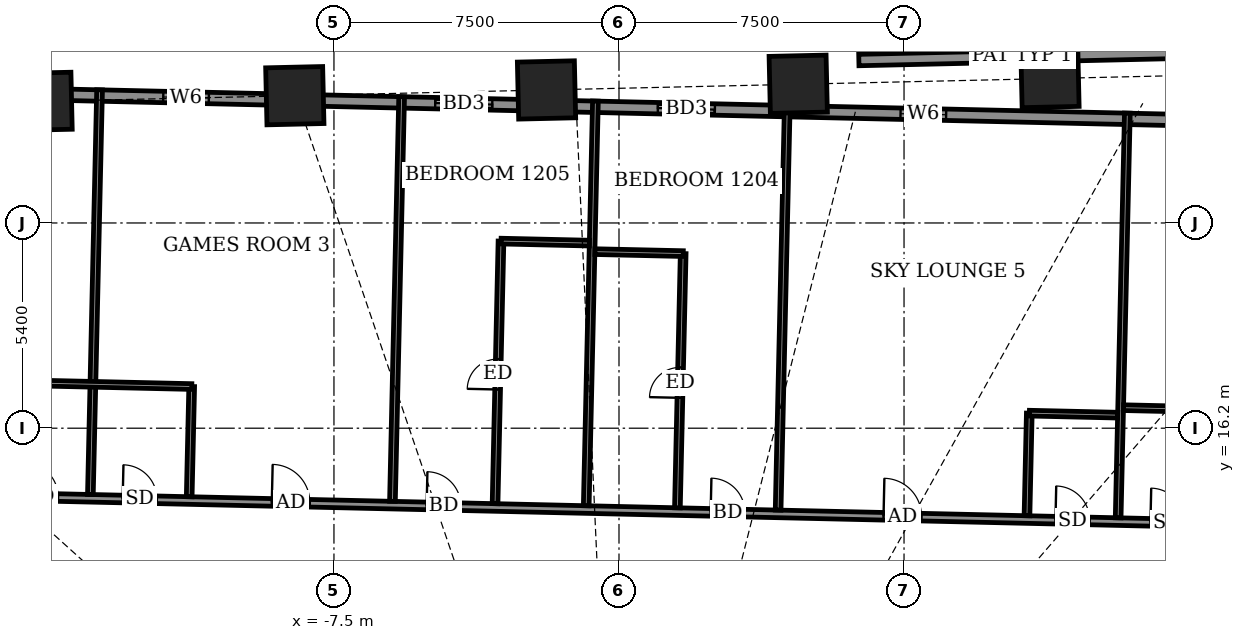
"""IFC4 building model, lengths in metres.
Left out: names, types, materials, properties, quantities, classifications, styles, units other than length and angle.
Written with IfcOpenShell. Run it as: python <this file> out.ifc"""

import sys

from ifc_helpers import new_model, si_unit, direction, frame, frame_2d, origin, origin_2d, place, context, subcontext, project, spatial, rectangle, extrude, element, fill, save


model = new_model("IFC4")
c1 = context("Model", 3, precision=1e-05, world=origin(), true_north=direction((0.0, 1.0)))
c2 = subcontext(c1, "Body", "Model", "MODEL_VIEW")
j1 = project(units=[si_unit("LENGTHUNIT", "METRE"), si_unit("PLANEANGLEUNIT", "RADIAN")], contexts=[c1])
p1 = place(None, origin())
s1 = spatial("IfcSite", under=j1, at=p1, CompositionType="ELEMENT")
p2 = place(p1, origin())
s2 = spatial("IfcBuilding", under=s1, at=p2, CompositionType="ELEMENT")
p3 = place(p2, frame((0.0, 0.0, 52.1)))
s3 = spatial("IfcBuildingStorey", under=s2, at=p3, CompositionType="ELEMENT", Elevation=52.1)
for number, where, z_axis, x_axis in (
    (1, (11.34, 25.4, -0.55), (0.0, 0.0, 1.0), (-1.0, -0.023, 0.0)),
    (2, (4.716, 25.25, -0.55), (0.0, 0.0, 1.0), (-1.0, -0.023, 0.0)),
    (3, (-1.907, 25.1, -0.55), (0.0, 0.0, 1.0), (-1.0, -0.023, 0.0)),
    (4, (-8.53, 24.949, -0.55), (0.0, 0.0, 1.0), (-1.0, -0.023, 0.0)),
    (5, (-15.154, 24.799, -0.55), (0.0, 0.0, 1.0), (-1.0, -0.023, 0.0)),
):
    element("IfcColumn", number, at=place(p3, frame(where, z_axis=z_axis, x_axis=x_axis)), inside=s3, PredefinedType="COLUMN", context=c2, shape_type="SweptSolid", body=[
        extrude(rectangle(XDim=1.5, YDim=1.5, at=origin_2d()), origin(), (0.0, 0.0, 1.0), 4.6),
    ])
p4 = place(p3, frame((27.407, 24.021, 0.0), z_axis=(0.0, 0.0, 1.0), x_axis=(-0.999742614779, 0.02268709312, 0.0)))
e6 = element("IfcWall", 6, at=p4, inside=s3, PredefinedType="SOLIDWALL", context=c2, shape_type="SweptSolid", body=[
    extrude(rectangle(XDim=49.943, YDim=0.3, at=frame_2d((24.971, 0.0))), origin(), (0.0, 0.0, 1.0), 2.25),
])
p5 = place(p4, frame((0.506, 0.0, 0.0)))
e7 = element("IfcOpeningElement", 7, at=p5, cuts=e6, PredefinedType="OPENING", context=c2, shape_type="SweptSolid", body=[
    extrude(rectangle(XDim=1.5, YDim=2.0, at=frame_2d((0.75, 1.0))), frame((0.0, 0.16, 0.0), z_axis=(0.0, -1.0, 0.0), x_axis=(1.0, 0.0, 0.0)), (0.0, 0.0, 1.0), 0.32),
])
p6 = place(p4, frame((11.448, 0.0, 0.5)))
e8 = element("IfcOpeningElement", 8, at=p6, cuts=e6, PredefinedType="OPENING", context=c2, shape_type="SweptSolid", body=[
    extrude(rectangle(XDim=1.2, YDim=1.1, at=frame_2d((0.6, 0.55))), frame((0.0, 0.16, 0.0), z_axis=(0.0, -1.0, 0.0), x_axis=(1.0, 0.0, 0.0)), (0.0, 0.0, 1.0), 0.32),
])
p7 = place(p4, frame((18.804, 0.0, 0.5)))
e9 = element("IfcOpeningElement", 9, at=p7, cuts=e6, PredefinedType="OPENING", context=c2, shape_type="SweptSolid", body=[
    extrude(rectangle(XDim=1.2, YDim=1.1, at=frame_2d((0.6, 0.55))), frame((0.0, 0.16, 0.0), z_axis=(0.0, -1.0, 0.0), x_axis=(1.0, 0.0, 0.0)), (0.0, 0.0, 1.0), 0.32),
])
p8 = place(p4, frame((24.891, 0.0, 0.0)))
e10 = element("IfcOpeningElement", 10, at=p8, cuts=e6, PredefinedType="OPENING", context=c2, shape_type="SweptSolid", body=[
    extrude(rectangle(XDim=1.5, YDim=2.0, at=frame_2d((0.75, 1.0))), frame((0.0, 0.16, 0.0), z_axis=(0.0, -1.0, 0.0), x_axis=(1.0, 0.0, 0.0)), (0.0, 0.0, 1.0), 0.32),
])
p9 = place(p4, frame((30.75, 0.0, 0.0)))
e11 = element("IfcOpeningElement", 11, at=p9, cuts=e6, PredefinedType="OPENING", context=c2, shape_type="SweptSolid", body=[
    extrude(rectangle(XDim=1.5, YDim=2.0, at=frame_2d((0.75, 1.0))), frame((0.0, 0.16, 0.0), z_axis=(0.0, -1.0, 0.0), x_axis=(1.0, 0.0, 0.0)), (0.0, 0.0, 1.0), 0.32),
])
p10 = place(p4, frame((38.209, 0.0, 0.5)))
e12 = element("IfcOpeningElement", 12, at=p10, cuts=e6, PredefinedType="OPENING", context=c2, shape_type="SweptSolid", body=[
    extrude(rectangle(XDim=1.2, YDim=1.1, at=frame_2d((0.6, 0.55))), frame((0.0, 0.16, 0.0), z_axis=(0.0, -1.0, 0.0), x_axis=(1.0, 0.0, 0.0)), (0.0, 0.0, 1.0), 0.32),
])
p11 = place(p4, frame((45.277, 0.0, 0.5)))
e13 = element("IfcOpeningElement", 13, at=p11, cuts=e6, PredefinedType="OPENING", context=c2, shape_type="SweptSolid", body=[
    extrude(rectangle(XDim=1.2, YDim=1.1, at=frame_2d((0.6, 0.55))), frame((0.0, 0.16, 0.0), z_axis=(0.0, -1.0, 0.0), x_axis=(1.0, 0.0, 0.0)), (0.0, 0.0, 1.0), 0.32),
])
p12 = place(p3, frame((6.311, 25.887, 0.0), z_axis=(0.0, 0.0, 1.0), x_axis=(0.999744761435, 0.022592299185, 0.0)))
e14 = element("IfcWall", 14, at=p12, inside=s3, PredefinedType="PARAPET", context=c2, shape_type="SweptSolid", body=[
    extrude(rectangle(XDim=8.591, YDim=0.3, at=frame_2d((4.295, 0.0))), origin(), (0.0, 0.0, 1.0), 0.9),
])
p13 = place(p3, frame((-26.206, 14.635, 0.0), z_axis=(0.0, 0.0, 1.0), x_axis=(0.999742550532, -0.022689924097, 0.0)))
e15 = element("IfcWall", 15, at=p13, inside=s3, PredefinedType="PARTITIONING", context=c2, shape_type="SweptSolid", body=[
    extrude(rectangle(XDim=53.025, YDim=0.2, at=frame_2d((26.512, 0.0))), origin(), (0.0, 0.0, 1.0), 2.1),
])
p14 = place(p13, frame((51.824, 0.0, 0.0)))
e16 = element("IfcOpeningElement", 16, at=p14, cuts=e15, PredefinedType="OPENING", context=c2, shape_type="SweptSolid", body=[
    extrude(rectangle(XDim=1.0, YDim=2.1, at=frame_2d((0.5, 1.05))), frame((0.0, 0.11, 0.0), z_axis=(0.0, -1.0, 0.0), x_axis=(1.0, 0.0, 0.0)), (0.0, 0.0, 1.0), 0.22),
])
p15 = place(p13, frame((48.1, 0.0, 0.0)))
e17 = element("IfcOpeningElement", 17, at=p15, cuts=e15, PredefinedType="OPENING", context=c2, shape_type="SweptSolid", body=[
    extrude(rectangle(XDim=0.9, YDim=2.1, at=frame_2d((0.45, 1.05))), frame((0.0, 0.11, 0.0), z_axis=(0.0, -1.0, 0.0), x_axis=(1.0, 0.0, 0.0)), (0.0, 0.0, 1.0), 0.22),
])
p16 = place(p13, frame((44.1, 0.0, 0.0)))
e18 = element("IfcOpeningElement", 18, at=p16, cuts=e15, PredefinedType="OPENING", context=c2, shape_type="SweptSolid", body=[
    extrude(rectangle(XDim=1.0, YDim=2.1, at=frame_2d((0.5, 1.05))), frame((0.0, 0.11, 0.0), z_axis=(0.0, -1.0, 0.0), x_axis=(1.0, 0.0, 0.0)), (0.0, 0.0, 1.0), 0.22),
])
p17 = place(p13, frame((40.2, 0.0, 0.0)))
e19 = element("IfcOpeningElement", 19, at=p17, cuts=e15, PredefinedType="OPENING", context=c2, shape_type="SweptSolid", body=[
    extrude(rectangle(XDim=0.9, YDim=2.1, at=frame_2d((0.45, 1.05))), frame((0.0, 0.11, 0.0), z_axis=(0.0, -1.0, 0.0), x_axis=(1.0, 0.0, 0.0)), (0.0, 0.0, 1.0), 0.22),
])
p18 = place(p13, frame((33.175, 0.0, 0.0)))
e20 = element("IfcOpeningElement", 20, at=p18, cuts=e15, PredefinedType="OPENING", context=c2, shape_type="SweptSolid", body=[
    extrude(rectangle(XDim=1.0, YDim=2.1, at=frame_2d((0.5, 1.05))), frame((0.0, 0.11, 0.0), z_axis=(0.0, -1.0, 0.0), x_axis=(1.0, 0.0, 0.0)), (0.0, 0.0, 1.0), 0.22),
])
p19 = place(p13, frame((37.7, 0.0, 0.0)))
e21 = element("IfcOpeningElement", 21, at=p19, cuts=e15, PredefinedType="OPENING", context=c2, shape_type="SweptSolid", body=[
    extrude(rectangle(XDim=0.9, YDim=2.1, at=frame_2d((0.45, 1.05))), frame((0.0, 0.11, 0.0), z_axis=(0.0, -1.0, 0.0), x_axis=(1.0, 0.0, 0.0)), (0.0, 0.0, 1.0), 0.22),
])
p20 = place(p13, frame((28.625, 0.0, 0.0)))
e22 = element("IfcOpeningElement", 22, at=p20, cuts=e15, PredefinedType="OPENING", context=c2, shape_type="SweptSolid", body=[
    extrude(rectangle(XDim=0.9, YDim=2.1, at=frame_2d((0.45, 1.05))), frame((0.0, 0.11, 0.0), z_axis=(0.0, -1.0, 0.0), x_axis=(1.0, 0.0, 0.0)), (0.0, 0.0, 1.0), 0.22),
])
p21 = place(p13, frame((21.15, 0.0, 0.0)))
e23 = element("IfcOpeningElement", 23, at=p21, cuts=e15, PredefinedType="OPENING", context=c2, shape_type="SweptSolid", body=[
    extrude(rectangle(XDim=0.9, YDim=2.1, at=frame_2d((0.45, 1.05))), frame((0.0, 0.11, 0.0), z_axis=(0.0, -1.0, 0.0), x_axis=(1.0, 0.0, 0.0)), (0.0, 0.0, 1.0), 0.22),
])
p22 = place(p13, frame((17.075, 0.0, 0.0)))
e24 = element("IfcOpeningElement", 24, at=p22, cuts=e15, PredefinedType="OPENING", context=c2, shape_type="SweptSolid", body=[
    extrude(rectangle(XDim=1.0, YDim=2.1, at=frame_2d((0.5, 1.05))), frame((0.0, 0.11, 0.0), z_axis=(0.0, -1.0, 0.0), x_axis=(1.0, 0.0, 0.0)), (0.0, 0.0, 1.0), 0.22),
])
p23 = place(p13, frame((13.15, 0.0, 0.0)))
e25 = element("IfcOpeningElement", 25, at=p23, cuts=e15, PredefinedType="OPENING", context=c2, shape_type="SweptSolid", body=[
    extrude(rectangle(XDim=0.9, YDim=2.1, at=frame_2d((0.45, 1.05))), frame((0.0, 0.11, 0.0), z_axis=(0.0, -1.0, 0.0), x_axis=(1.0, 0.0, 0.0)), (0.0, 0.0, 1.0), 0.22),
])
p24 = place(p13, frame((3.65, 0.0, 0.0)))
e26 = element("IfcOpeningElement", 26, at=p24, cuts=e15, PredefinedType="OPENING", context=c2, shape_type="SweptSolid", body=[
    extrude(rectangle(XDim=1.0, YDim=2.1, at=frame_2d((0.5, 1.05))), frame((0.0, 0.11, 0.0), z_axis=(0.0, -1.0, 0.0), x_axis=(1.0, 0.0, 0.0)), (0.0, 0.0, 1.0), 0.22),
])
p25 = place(p13, frame((10.55, 0.0, 0.0)))
e27 = element("IfcOpeningElement", 27, at=p25, cuts=e15, PredefinedType="OPENING", context=c2, shape_type="SweptSolid", body=[
    extrude(rectangle(XDim=0.9, YDim=2.1, at=frame_2d((0.45, 1.05))), frame((0.0, 0.11, 0.0), z_axis=(0.0, -1.0, 0.0), x_axis=(1.0, 0.0, 0.0)), (0.0, 0.0, 1.0), 0.22),
])
p26 = place(p3, frame((-13.909, 14.456, 0.0), z_axis=(0.0, 0.0, 1.0), x_axis=(0.022718280885, 0.999741906551, 0.0)))
e28 = element("IfcWall", 28, at=p26, inside=s3, PredefinedType="PARTITIONING", context=c2, shape_type="SweptSolid", body=[
    extrude(rectangle(XDim=10.65, YDim=0.15, at=frame_2d((5.325, 0.0))), origin(), (0.0, 0.0, 1.0), 2.35),
])
p27 = place(p3, frame((-11.309, 14.397, 0.0), z_axis=(0.0, 0.0, 1.0), x_axis=(0.022817032779, 0.999739657619, 0.0)))
e29 = element("IfcWall", 29, at=p27, inside=s3, PredefinedType="PARTITIONING", context=c2, shape_type="SweptSolid", body=[
    extrude(rectangle(XDim=2.9, YDim=0.15, at=frame_2d((1.45, 0.0))), origin(), (0.0, 0.0, 1.0), 4.05),
])
p28 = place(p3, frame((-5.961, 14.276, 0.0), z_axis=(0.0, 0.0, 1.0), x_axis=(0.022717760224, 0.999741918382, 0.0)))
e30 = element("IfcWall", 30, at=p28, inside=s3, PredefinedType="PARTITIONING", context=c2, shape_type="SweptSolid", body=[
    extrude(rectangle(XDim=10.65, YDim=0.15, at=frame_2d((5.325, 0.0))), origin(), (0.0, 0.0, 1.0), 2.35),
])
p29 = place(p3, frame((-3.261, 14.214, 0.0), z_axis=(0.0, 0.0, 1.0), x_axis=(0.022574548881, 0.9997451624, 0.0)))
e31 = element("IfcWall", 31, at=p29, inside=s3, PredefinedType="PARTITIONING", context=c2, shape_type="SweptSolid", body=[
    extrude(rectangle(XDim=6.911, YDim=0.15, at=frame_2d((3.455, 0.0))), origin(), (0.0, 0.0, 1.0), 4.05),
])
p30 = place(p29, frame((3.005, 0.0, 0.0)))
e32 = element("IfcOpeningElement", 32, at=p30, cuts=e31, PredefinedType="OPENING", context=c2, shape_type="SweptSolid", body=[
    extrude(rectangle(XDim=0.8, YDim=2.1, at=frame_2d((0.4, 1.05))), frame((0.0, 0.085, 0.0), z_axis=(0.0, -1.0, 0.0), x_axis=(1.0, 0.0, 0.0)), (0.0, 0.0, 1.0), 0.17),
])
p31 = place(p3, frame((-0.862, 14.16, 0.0), z_axis=(0.0, 0.0, 1.0), x_axis=(0.022718280885, 0.999741906551, 0.0)))
e33 = element("IfcWall", 33, at=p31, inside=s3, PredefinedType="PARTITIONING", context=c2, shape_type="SweptSolid", body=[
    extrude(rectangle(XDim=10.65, YDim=0.15, at=frame_2d((5.325, 0.0))), origin(), (0.0, 0.0, 1.0), 2.35),
])
p32 = place(p3, frame((1.537, 14.105, 0.0), z_axis=(0.0, 0.0, 1.0), x_axis=(0.022696538909, 0.999742400382, 0.0)))
e34 = element("IfcWall", 34, at=p32, inside=s3, PredefinedType="PARTITIONING", context=c2, shape_type="SweptSolid", body=[
    extrude(rectangle(XDim=6.691, YDim=0.15, at=frame_2d((3.345, 0.0))), origin(), (0.0, 0.0, 1.0), 4.05),
])
p33 = place(p32, frame((2.895, 0.0, 0.0)))
e35 = element("IfcOpeningElement", 35, at=p33, cuts=e34, PredefinedType="OPENING", context=c2, shape_type="SweptSolid", body=[
    extrude(rectangle(XDim=0.8, YDim=2.1, at=frame_2d((0.4, 1.05))), frame((0.0, 0.085, 0.0), z_axis=(0.0, -1.0, 0.0), x_axis=(1.0, 0.0, 0.0)), (0.0, 0.0, 1.0), 0.17),
])
p34 = place(p3, frame((4.187, 14.045, 0.0), z_axis=(0.0, 0.0, 1.0), x_axis=(0.02262403694, 0.999744043719, 0.0)))
e36 = element("IfcWall", 36, at=p34, inside=s3, PredefinedType="PARTITIONING", context=c2, shape_type="SweptSolid", body=[
    extrude(rectangle(XDim=10.651, YDim=0.15, at=frame_2d((5.325, 0.0))), origin(), (0.0, 0.0, 1.0), 2.65),
])
p35 = place(p3, frame((10.735, 13.897, 0.0), z_axis=(0.0, 0.0, 1.0), x_axis=(0.022518033722, 0.999746436932, 0.0)))
e37 = element("IfcWall", 37, at=p35, inside=s3, PredefinedType="PARTITIONING", context=c2, shape_type="SweptSolid", body=[
    extrude(rectangle(XDim=2.7, YDim=0.15, at=frame_2d((1.35, 0.0))), origin(), (0.0, 0.0, 1.0), 4.05),
])
p36 = place(p3, frame((13.134, 13.842, 0.0), z_axis=(0.0, 0.0, 1.0), x_axis=(0.022716198383, 0.999741953872, 0.0)))
e38 = element("IfcWall", 38, at=p36, inside=s3, PredefinedType="PARTITIONING", context=c2, shape_type="SweptSolid", body=[
    extrude(rectangle(XDim=10.651, YDim=0.15, at=frame_2d((5.325, 0.0))), origin(), (0.0, 0.0, 1.0), 2.25),
])
p37 = place(p3, frame((10.798, 16.596, 0.0), z_axis=(0.0, 0.0, 1.0), x_axis=(0.999740478815, -0.022781023197, 0.0)))
e39 = element("IfcWall", 39, at=p37, inside=s3, PredefinedType="PARTITIONING", context=c2, shape_type="SweptSolid", body=[
    extrude(rectangle(XDim=2.325, YDim=0.15, at=frame_2d((1.163, 0.0))), origin(), (0.0, 0.0, 1.0), 4.05),
])
p38 = place(p3, frame((-16.44, 17.414, 0.0), z_axis=(0.0, 0.0, 1.0), x_axis=(0.999741811307, -0.022722471786, 0.0)))
e40 = element("IfcWall", 40, at=p38, inside=s3, PredefinedType="PARTITIONING", context=c2, shape_type="SweptSolid", body=[
    extrude(rectangle(XDim=5.2, YDim=0.15, at=frame_2d((2.6, 0.0))), origin(), (0.0, 0.0, 1.0), 4.05),
])
p39 = place(p3, frame((13.277, 16.74, 0.0), z_axis=(0.0, 0.0, 1.0), x_axis=(0.999746307581, -0.022523775833, 0.0)))
e41 = element("IfcWall", 41, at=p39, inside=s3, PredefinedType="PARTITIONING", context=c2, shape_type="SweptSolid", body=[
    extrude(rectangle(XDim=2.526, YDim=0.15, at=frame_2d((1.263, 0.0))), origin(), (0.0, 0.0, 1.0), 2.25),
])
p40 = place(p3, frame((-0.633, 20.846, 0.0), z_axis=(0.0, 0.0, 1.0), x_axis=(0.999749744571, -0.022370700241, 0.0)))
e42 = element("IfcWall", 42, at=p40, inside=s3, PredefinedType="PARTITIONING", context=c2, shape_type="SweptSolid", body=[
    extrude(rectangle(XDim=2.324, YDim=0.15, at=frame_2d((1.162, 0.0))), origin(), (0.0, 0.0, 1.0), 2.75),
])
p41 = place(p3, frame((-3.103, 21.123, 0.0), z_axis=(0.0, 0.0, 1.0), x_axis=(0.999740478815, -0.022781023197, 0.0)))
e43 = element("IfcWall", 43, at=p41, inside=s3, PredefinedType="PARTITIONING", context=c2, shape_type="SweptSolid", body=[
    extrude(rectangle(XDim=2.325, YDim=0.15, at=frame_2d((1.163, 0.0))), origin(), (0.0, 0.0, 1.0), 2.75),
])
p42 = place(p7, origin())
e44 = element("IfcWindow", 44, at=p42, inside=s3, PartitioningType="SINGLE_PANEL", PredefinedType="WINDOW", context=c2, shape_type="SweptSolid", body=[
    extrude(rectangle(XDim=1.2, YDim=1.1, at=frame_2d((0.6, 0.55))), frame((0.0, 0.03, 0.0), z_axis=(0.0, -1.0, 0.0), x_axis=(1.0, 0.0, 0.0)), (0.0, 0.0, 1.0), 0.06),
])
fill(e9, e44)
p43 = place(p8, origin())
e45 = element("IfcDoor", 45, at=p43, inside=s3, OperationType="SLIDING_TO_LEFT", PredefinedType="DOOR", context=c2, shape_type="SweptSolid", body=[
    extrude(rectangle(XDim=1.5, YDim=2.0, at=frame_2d((0.75, 1.0))), frame((0.0, 0.025, 0.0), z_axis=(0.0, -1.0, 0.0), x_axis=(1.0, 0.0, 0.0)), (0.0, 0.0, 1.0), 0.05),
])
fill(e10, e45)
p44 = place(p9, origin())
e46 = element("IfcDoor", 46, at=p44, inside=s3, OperationType="SLIDING_TO_LEFT", PredefinedType="DOOR", context=c2, shape_type="SweptSolid", body=[
    extrude(rectangle(XDim=1.5, YDim=2.0, at=frame_2d((0.75, 1.0))), frame((0.0, 0.025, 0.0), z_axis=(0.0, -1.0, 0.0), x_axis=(1.0, 0.0, 0.0)), (0.0, 0.0, 1.0), 0.05),
])
fill(e11, e46)
p45 = place(p10, origin())
e47 = element("IfcWindow", 47, at=p45, inside=s3, PartitioningType="SINGLE_PANEL", PredefinedType="WINDOW", context=c2, shape_type="SweptSolid", body=[
    extrude(rectangle(XDim=1.2, YDim=1.1, at=frame_2d((0.6, 0.55))), frame((0.0, 0.03, 0.0), z_axis=(0.0, -1.0, 0.0), x_axis=(1.0, 0.0, 0.0)), (0.0, 0.0, 1.0), 0.06),
])
fill(e12, e47)
p46 = place(p17, origin())
e48 = element("IfcDoor", 48, at=p46, inside=s3, OperationType="SINGLE_SWING_RIGHT", PredefinedType="DOOR", context=c2, shape_type="SweptSolid", body=[
    extrude(rectangle(XDim=0.9, YDim=2.1, at=frame_2d((0.45, 1.05))), frame((0.0, 0.025, 0.0), z_axis=(0.0, -1.0, 0.0), x_axis=(1.0, 0.0, 0.0)), (0.0, 0.0, 1.0), 0.05),
])
fill(e19, e48)
p47 = place(p18, origin())
e49 = element("IfcDoor", 49, at=p47, inside=s3, OperationType="SINGLE_SWING_RIGHT", PredefinedType="DOOR", context=c2, shape_type="SweptSolid", body=[
    extrude(rectangle(XDim=1.0, YDim=2.1, at=frame_2d((0.5, 1.05))), frame((0.0, 0.025, 0.0), z_axis=(0.0, -1.0, 0.0), x_axis=(1.0, 0.0, 0.0)), (0.0, 0.0, 1.0), 0.05),
])
fill(e20, e49)
p48 = place(p19, origin())
e50 = element("IfcDoor", 50, at=p48, inside=s3, OperationType="SINGLE_SWING_LEFT", PredefinedType="DOOR", context=c2, shape_type="SweptSolid", body=[
    extrude(rectangle(XDim=0.9, YDim=2.1, at=frame_2d((0.45, 1.05))), frame((0.0, 0.025, 0.0), z_axis=(0.0, -1.0, 0.0), x_axis=(1.0, 0.0, 0.0)), (0.0, 0.0, 1.0), 0.05),
])
fill(e21, e50)
p49 = place(p20, origin())
e51 = element("IfcDoor", 51, at=p49, inside=s3, OperationType="SINGLE_SWING_RIGHT", PredefinedType="DOOR", context=c2, shape_type="SweptSolid", body=[
    extrude(rectangle(XDim=0.9, YDim=2.1, at=frame_2d((0.45, 1.05))), frame((0.0, 0.025, 0.0), z_axis=(0.0, -1.0, 0.0), x_axis=(1.0, 0.0, 0.0)), (0.0, 0.0, 1.0), 0.05),
])
fill(e22, e51)
p50 = place(p33, origin())
e52 = element("IfcDoor", 52, at=p50, inside=s3, OperationType="SINGLE_SWING_RIGHT", PredefinedType="DOOR", context=c2, shape_type="SweptSolid", body=[
    extrude(rectangle(XDim=0.8, YDim=2.1, at=frame_2d((0.4, 1.05))), frame((0.0, 0.025, 0.0), z_axis=(0.0, -1.0, 0.0), x_axis=(1.0, 0.0, 0.0)), (0.0, 0.0, 1.0), 0.05),
])
fill(e35, e52)
p51 = place(p21, origin())
e53 = element("IfcDoor", 53, at=p51, inside=s3, OperationType="SINGLE_SWING_LEFT", PredefinedType="DOOR", context=c2, shape_type="SweptSolid", body=[
    extrude(rectangle(XDim=0.9, YDim=2.1, at=frame_2d((0.45, 1.05))), frame((0.0, 0.025, 0.0), z_axis=(0.0, -1.0, 0.0), x_axis=(1.0, 0.0, 0.0)), (0.0, 0.0, 1.0), 0.05),
])
fill(e23, e53)
p52 = place(p30, origin())
e54 = element("IfcDoor", 54, at=p52, inside=s3, OperationType="SINGLE_SWING_LEFT", PredefinedType="DOOR", context=c2, shape_type="SweptSolid", body=[
    extrude(rectangle(XDim=0.8, YDim=2.1, at=frame_2d((0.4, 1.05))), frame((0.0, 0.025, 0.0), z_axis=(0.0, -1.0, 0.0), x_axis=(1.0, 0.0, 0.0)), (0.0, 0.0, 1.0), 0.05),
])
fill(e32, e54)
p53 = place(p22, origin())
e55 = element("IfcDoor", 55, at=p53, inside=s3, OperationType="SINGLE_SWING_LEFT", PredefinedType="DOOR", context=c2, shape_type="SweptSolid", body=[
    extrude(rectangle(XDim=1.0, YDim=2.1, at=frame_2d((0.5, 1.05))), frame((0.0, 0.025, 0.0), z_axis=(0.0, -1.0, 0.0), x_axis=(1.0, 0.0, 0.0)), (0.0, 0.0, 1.0), 0.05),
])
fill(e24, e55)
p54 = place(p23, origin())
e56 = element("IfcDoor", 56, at=p54, inside=s3, OperationType="SINGLE_SWING_RIGHT", PredefinedType="DOOR", context=c2, shape_type="SweptSolid", body=[
    extrude(rectangle(XDim=0.9, YDim=2.1, at=frame_2d((0.45, 1.05))), frame((0.0, 0.025, 0.0), z_axis=(0.0, -1.0, 0.0), x_axis=(1.0, 0.0, 0.0)), (0.0, 0.0, 1.0), 0.05),
])
fill(e25, e56)
p55 = place(p25, origin())
e57 = element("IfcDoor", 57, at=p55, inside=s3, OperationType="SINGLE_SWING_LEFT", PredefinedType="DOOR", context=c2, shape_type="SweptSolid", body=[
    extrude(rectangle(XDim=0.9, YDim=2.1, at=frame_2d((0.45, 1.05))), frame((0.0, 0.025, 0.0), z_axis=(0.0, -1.0, 0.0), x_axis=(1.0, 0.0, 0.0)), (0.0, 0.0, 1.0), 0.05),
])
fill(e27, e57)
save(model, sys.argv[1])
